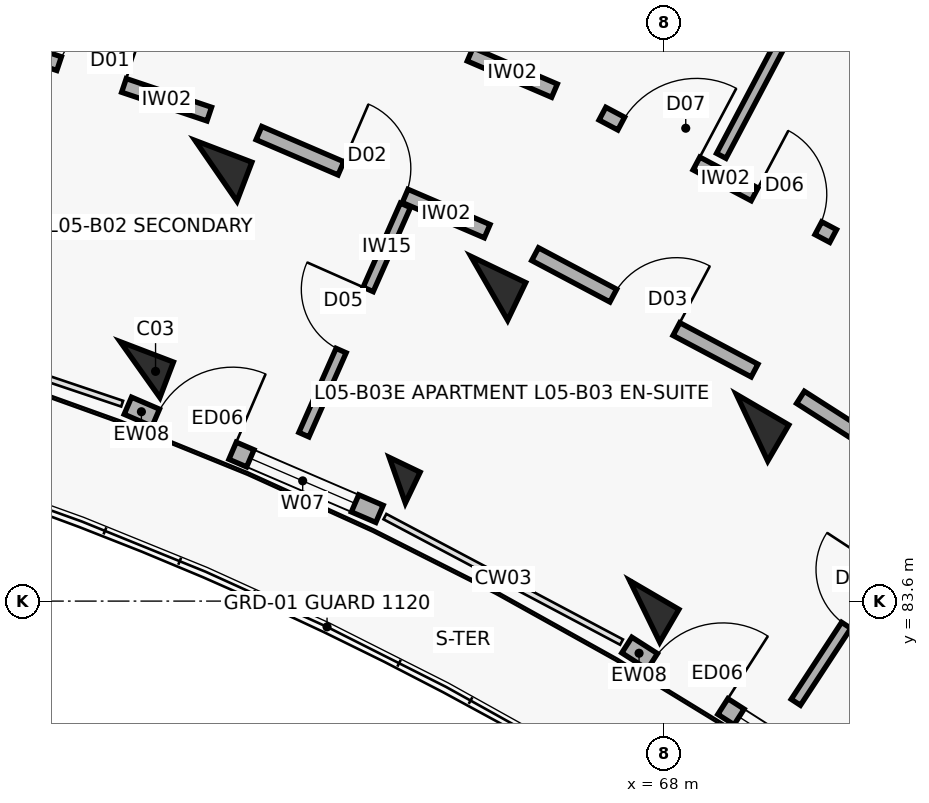
"""IFC4 building model, lengths in metres.
Left out: names, types, materials, properties, quantities, classifications, styles, units other than length and angle.
Written with IfcOpenShell. Run it as: python <this file> out.ifc"""

import sys

from ifc_helpers import new_model, si_unit, direction, frame, frame_2d, origin, origin_2d, place, context, subcontext, project, spatial, rectangle, extrude, element, fill, save


model = new_model("IFC4")
c1 = context("Model", 3, precision=1e-05, world=origin(), true_north=direction((0.0, 1.0)))
c2 = subcontext(c1, "Body", "Model", "MODEL_VIEW")
j1 = project(units=[si_unit("LENGTHUNIT", "METRE"), si_unit("PLANEANGLEUNIT", "RADIAN")], contexts=[c1])
p1 = place(None, origin())
s1 = spatial("IfcSite", under=j1, at=p1, CompositionType="ELEMENT")
p2 = place(p1, origin())
s2 = spatial("IfcBuilding", under=s1, at=p2, CompositionType="ELEMENT")
p3 = place(p2, frame((0.0, 0.0, 17.4)))
s3 = spatial("IfcBuildingStorey", under=s2, at=p3, CompositionType="ELEMENT", Elevation=17.4)
p4 = place(p3, frame((61.111, 86.646, 0.0), z_axis=(0.0, 0.0, 1.0), x_axis=(0.357064076459, 0.934079892355, 0.0)))
e1 = element("IfcColumn", 1, at=p4, inside=s3, PredefinedType="COLUMN", context=c2, shape_type="SweptSolid", body=[
    extrude(rectangle(XDim=0.5, YDim=0.75, at=origin_2d()), origin(), (0.0, 0.0, 1.0), 3.1),
])
p5 = place(p3, frame((62.111, 89.261, 0.0), z_axis=(0.0, 0.0, 1.0), x_axis=(0.357064076459, 0.934079892355, 0.0)))
e2 = element("IfcColumn", 2, at=p5, inside=s3, PredefinedType="COLUMN", context=c2, shape_type="SweptSolid", body=[
    extrude(rectangle(XDim=0.55, YDim=0.8, at=origin_2d()), origin(), (0.0, 0.0, 1.0), 3.1),
])
p6 = place(p3, frame((64.496, 85.191, 0.0), z_axis=(0.0, 0.0, 1.0), x_axis=(0.432085748802, 0.901832526405, 0.0)))
e3 = element("IfcColumn", 3, at=p6, inside=s3, PredefinedType="COLUMN", context=c2, shape_type="SweptSolid", body=[
    extrude(rectangle(XDim=0.45, YDim=0.45, at=origin_2d()), origin(), (0.0, 0.0, 1.0), 3.1),
])
p7 = place(p3, frame((65.706, 87.716, 0.0), z_axis=(0.0, 0.0, 1.0), x_axis=(0.432085748802, 0.901832526405, 0.0)))
e4 = element("IfcColumn", 4, at=p7, inside=s3, PredefinedType="COLUMN", context=c2, shape_type="SweptSolid", body=[
    extrude(rectangle(XDim=0.55, YDim=0.8, at=origin_2d()), origin(), (0.0, 0.0, 1.0), 3.1),
])
p8 = place(p3, frame((67.751, 83.464, 0.0), z_axis=(0.0, 0.0, 1.0), x_axis=(0.504226211181, 0.863571611366, 0.0)))
e5 = element("IfcColumn", 5, at=p8, inside=s3, PredefinedType="COLUMN", context=c2, shape_type="SweptSolid", body=[
    extrude(rectangle(XDim=0.5, YDim=0.75, at=origin_2d()), origin(), (0.0, 0.0, 1.0), 3.1),
])
p9 = place(p3, frame((69.163, 85.882, 0.0), z_axis=(0.0, 0.0, 1.0), x_axis=(0.504226211181, 0.863571611366, 0.0)))
e6 = element("IfcColumn", 6, at=p9, inside=s3, PredefinedType="COLUMN", context=c2, shape_type="SweptSolid", body=[
    extrude(rectangle(XDim=0.55, YDim=0.8, at=origin_2d()), origin(), (0.0, 0.0, 1.0), 3.1),
])
p10 = place(p3, frame((60.951, 86.171, 0.0), z_axis=(0.0, 0.0, 1.0), x_axis=(0.918713438577, -0.394924825477, 0.0)))
e7 = element("IfcWall", 7, at=p10, inside=s3, PredefinedType="SOLIDWALL", context=c2, shape_type="SweptSolid", body=[
    extrude(rectangle(XDim=3.604, YDim=0.245, at=frame_2d((1.802, 0.0))), origin(), (0.0, 0.0, 1.0), 2.25),
])
p11 = place(p10, frame((0.4, 0.0, 0.0)))
e8 = element("IfcOpeningElement", 8, at=p11, cuts=e7, PredefinedType="OPENING", context=c2, shape_type="SweptSolid", body=[
    extrude(rectangle(XDim=1.1, YDim=2.15, at=frame_2d((0.55, 1.075))), frame((0.0, 0.133, 0.0), z_axis=(0.0, -1.0, 0.0), x_axis=(1.0, 0.0, 0.0)), (0.0, 0.0, 1.0), 0.265),
])
p12 = place(p10, frame((1.754, 0.0, 0.35)))
e9 = element("IfcOpeningElement", 9, at=p12, cuts=e7, PredefinedType="OPENING", context=c2, shape_type="SweptSolid", body=[
    extrude(rectangle(XDim=1.5, YDim=1.65, at=frame_2d((0.75, 0.825))), frame((0.0, 0.133, 0.0), z_axis=(0.0, -1.0, 0.0), x_axis=(1.0, 0.0, 0.0)), (0.0, 0.0, 1.0), 0.265),
])
p13 = place(p3, frame((67.515, 83.022, 0.0), z_axis=(0.0, 0.0, 1.0), x_axis=(0.84225540507, -0.539078688718, 0.0)))
e10 = element("IfcWall", 10, at=p13, inside=s3, PredefinedType="SOLIDWALL", context=c2, shape_type="SweptSolid", body=[
    extrude(rectangle(XDim=3.604, YDim=0.245, at=frame_2d((1.802, 0.0))), origin(), (0.0, 0.0, 1.0), 2.25),
])
p14 = place(p13, frame((0.4, 0.0, 0.0)))
e11 = element("IfcOpeningElement", 11, at=p14, cuts=e10, PredefinedType="OPENING", context=c2, shape_type="SweptSolid", body=[
    extrude(rectangle(XDim=1.1, YDim=2.15, at=frame_2d((0.55, 1.075))), frame((0.0, 0.133, 0.0), z_axis=(0.0, -1.0, 0.0), x_axis=(1.0, 0.0, 0.0)), (0.0, 0.0, 1.0), 0.265),
])
p15 = place(p13, frame((1.754, 0.0, 0.35)))
e12 = element("IfcOpeningElement", 12, at=p15, cuts=e10, PredefinedType="OPENING", context=c2, shape_type="SweptSolid", body=[
    extrude(rectangle(XDim=1.5, YDim=1.65, at=frame_2d((0.75, 0.825))), frame((0.0, 0.133, 0.0), z_axis=(0.0, -1.0, 0.0), x_axis=(1.0, 0.0, 0.0)), (0.0, 0.0, 1.0), 0.265),
])
p16 = place(p3, frame((58.923, 91.049, 0.0), z_axis=(0.0, 0.0, 1.0), x_axis=(0.94787351033, -0.318646839643, 0.0)))
e13 = element("IfcWall", 13, at=p16, inside=s3, PredefinedType="SOLIDWALL", context=c2, shape_type="SweptSolid", body=[
    extrude(rectangle(XDim=3.269, YDim=0.19, at=frame_2d((1.634, 0.0))), origin(), (0.0, 0.0, 1.0), 2.08),
])
p17 = place(p16, frame((1.184, 0.0, 0.0)))
e14 = element("IfcOpeningElement", 14, at=p17, cuts=e13, PredefinedType="OPENING", context=c2, shape_type="SweptSolid", body=[
    extrude(rectangle(XDim=0.9, YDim=2.1, at=frame_2d((0.45, 1.05))), frame((0.0, 0.105, 0.0), z_axis=(0.0, -1.0, 0.0), x_axis=(1.0, 0.0, 0.0)), (0.0, 0.0, 1.0), 0.21),
])
p18 = place(p3, frame((63.407, 91.673, 0.0), z_axis=(0.0, 0.0, 1.0), x_axis=(0.918718172399, -0.394913813008, 0.0)))
e15 = element("IfcWall", 15, at=p18, inside=s3, PredefinedType="SOLIDWALL", context=c2, shape_type="SweptSolid", body=[
    extrude(rectangle(XDim=3.436, YDim=0.19, at=frame_2d((1.718, 0.0))), origin(), (0.0, 0.0, 1.0), 2.08),
])
p19 = place(p18, frame((1.208, 0.0, 0.0)))
e16 = element("IfcOpeningElement", 16, at=p19, cuts=e15, PredefinedType="OPENING", context=c2, shape_type="SweptSolid", body=[
    extrude(rectangle(XDim=1.02, YDim=2.15, at=frame_2d((0.51, 1.075))), frame((0.0, 0.105, 0.0), z_axis=(0.0, -1.0, 0.0), x_axis=(1.0, 0.0, 0.0)), (0.0, 0.0, 1.0), 0.21),
])
p20 = place(p3, frame((62.675, 89.758, 0.0), z_axis=(0.0, 0.0, 1.0), x_axis=(0.918723391052, -0.394901672235, 0.0)))
e17 = element("IfcWall", 17, at=p20, inside=s3, PredefinedType="SOLIDWALL", context=c2, shape_type="SweptSolid", body=[
    extrude(rectangle(XDim=3.269, YDim=0.19, at=frame_2d((1.634, 0.0))), origin(), (0.0, 0.0, 1.0), 2.08),
])
p21 = place(p20, frame((1.174, 0.0, 0.0)))
e18 = element("IfcOpeningElement", 18, at=p21, cuts=e17, PredefinedType="OPENING", context=c2, shape_type="SweptSolid", body=[
    extrude(rectangle(XDim=0.92, YDim=2.1, at=frame_2d((0.46, 1.05))), frame((0.0, 0.105, 0.0), z_axis=(0.0, -1.0, 0.0), x_axis=(1.0, 0.0, 0.0)), (0.0, 0.0, 1.0), 0.21),
])
p22 = place(p3, frame((63.267, 85.79, 0.0), z_axis=(0.0, 0.0, 1.0), x_axis=(0.404545283439, 0.91451796792, 0.0)))
e19 = element("IfcWall", 19, at=p22, inside=s3, PredefinedType="PARTITIONING", context=c2, shape_type="SweptSolid", body=[
    extrude(rectangle(XDim=3.3, YDim=0.145, at=frame_2d((1.65, 0.0))), origin(), (0.0, 0.0, 1.0), 2.08),
])
p23 = place(p22, frame((1.21, 0.0, 0.0)))
e20 = element("IfcOpeningElement", 20, at=p23, cuts=e19, PredefinedType="OPENING", context=c2, shape_type="SweptSolid", body=[
    extrude(rectangle(XDim=0.88, YDim=2.1, at=frame_2d((0.44, 1.05))), frame((0.0, 0.083, 0.0), z_axis=(0.0, -1.0, 0.0), x_axis=(1.0, 0.0, 0.0)), (0.0, 0.0, 1.0), 0.165),
])
p24 = place(p3, frame((67.194, 90.014, 0.0), z_axis=(0.0, 0.0, 1.0), x_axis=(0.883410853063, -0.468599258099, 0.0)))
e21 = element("IfcWall", 21, at=p24, inside=s3, PredefinedType="SOLIDWALL", context=c2, shape_type="SweptSolid", body=[
    extrude(rectangle(XDim=3.436, YDim=0.19, at=frame_2d((1.718, 0.0))), origin(), (0.0, 0.0, 1.0), 2.08),
])
p25 = place(p24, frame((0.28, 0.0, 0.0)))
e22 = element("IfcOpeningElement", 22, at=p25, cuts=e21, PredefinedType="OPENING", context=c2, shape_type="SweptSolid", body=[
    extrude(rectangle(XDim=1.12, YDim=2.15, at=frame_2d((0.56, 1.075))), frame((0.0, 0.105, 0.0), z_axis=(0.0, -1.0, 0.0), x_axis=(1.0, 0.0, 0.0)), (0.0, 0.0, 1.0), 0.21),
])
p26 = place(p24, frame((2.266, 0.0, 0.0)))
e23 = element("IfcOpeningElement", 23, at=p26, cuts=e21, PredefinedType="OPENING", context=c2, shape_type="SweptSolid", body=[
    extrude(rectangle(XDim=0.95, YDim=2.1, at=frame_2d((0.475, 1.05))), frame((0.0, 0.105, 0.0), z_axis=(0.0, -1.0, 0.0), x_axis=(1.0, 0.0, 0.0)), (0.0, 0.0, 1.0), 0.21),
])
p27 = place(p3, frame((66.309, 88.165, 0.0), z_axis=(0.0, 0.0, 1.0), x_axis=(0.883444301944, -0.468536194293, 0.0)))
e24 = element("IfcWall", 24, at=p27, inside=s3, PredefinedType="SOLIDWALL", context=c2, shape_type="SweptSolid", body=[
    extrude(rectangle(XDim=3.269, YDim=0.19, at=frame_2d((1.634, 0.0))), origin(), (0.0, 0.0, 1.0), 2.08),
])
p28 = place(p27, frame((1.164, 0.0, 0.0)))
e25 = element("IfcOpeningElement", 25, at=p28, cuts=e24, PredefinedType="OPENING", context=c2, shape_type="SweptSolid", body=[
    extrude(rectangle(XDim=0.94, YDim=2.1, at=frame_2d((0.47, 1.05))), frame((0.0, 0.105, 0.0), z_axis=(0.0, -1.0, 0.0), x_axis=(1.0, 0.0, 0.0)), (0.0, 0.0, 1.0), 0.21),
])
p29 = place(p3, frame((68.758, 89.459, 0.0), z_axis=(0.0, 0.0, 1.0), x_axis=(0.467208910392, 0.884146952746, 0.0)))
e26 = element("IfcWall", 26, at=p29, inside=s3, PredefinedType="PARTITIONING", context=c2, shape_type="SweptSolid", body=[
    extrude(rectangle(XDim=7.95, YDim=0.14, at=frame_2d((3.975, 0.0))), origin(), (0.0, 0.0, 1.0), 2.08),
])
p30 = place(p29, frame((6.05, 0.0, 0.0)))
e27 = element("IfcOpeningElement", 27, at=p30, cuts=e26, PredefinedType="OPENING", context=c2, shape_type="SweptSolid", body=[
    extrude(rectangle(XDim=0.92, YDim=2.1, at=frame_2d((0.46, 1.05))), frame((0.0, 0.08, 0.0), z_axis=(0.0, -1.0, 0.0), x_axis=(1.0, 0.0, 0.0)), (0.0, 0.0, 1.0), 0.16),
])
p31 = place(p3, frame((69.8, 86.281, 0.0), z_axis=(0.0, 0.0, 1.0), x_axis=(0.842225276846, -0.539125758095, 0.0)))
e28 = element("IfcWall", 28, at=p31, inside=s3, PredefinedType="SOLIDWALL", context=c2, shape_type="SweptSolid", body=[
    extrude(rectangle(XDim=3.269, YDim=0.19, at=frame_2d((1.634, 0.0))), origin(), (0.0, 0.0, 1.0), 2.08),
])
p32 = place(p31, frame((1.154, 0.0, 0.0)))
e29 = element("IfcOpeningElement", 29, at=p32, cuts=e28, PredefinedType="OPENING", context=c2, shape_type="SweptSolid", body=[
    extrude(rectangle(XDim=0.96, YDim=2.1, at=frame_2d((0.48, 1.05))), frame((0.0, 0.105, 0.0), z_axis=(0.0, -1.0, 0.0), x_axis=(1.0, 0.0, 0.0)), (0.0, 0.0, 1.0), 0.21),
])
p33 = place(p3, frame((69.739, 82.269, 0.0), z_axis=(0.0, 0.0, 1.0), x_axis=(0.547920940513, 0.836530120765, 0.0)))
e30 = element("IfcWall", 30, at=p33, inside=s3, PredefinedType="PARTITIONING", context=c2, shape_type="SweptSolid", body=[
    extrude(rectangle(XDim=3.3, YDim=0.145, at=frame_2d((1.65, 0.0))), origin(), (0.0, 0.0, 1.0), 2.08),
])
p34 = place(p33, frame((1.21, 0.0, 0.0)))
e31 = element("IfcOpeningElement", 31, at=p34, cuts=e30, PredefinedType="OPENING", context=c2, shape_type="SweptSolid", body=[
    extrude(rectangle(XDim=0.88, YDim=2.1, at=frame_2d((0.44, 1.05))), frame((0.0, 0.083, 0.0), z_axis=(0.0, -1.0, 0.0), x_axis=(1.0, 0.0, 0.0)), (0.0, 0.0, 1.0), 0.165),
])
p35 = place(p11, origin())
e32 = element("IfcDoor", 32, at=p35, inside=s3, OperationType="SINGLE_SWING_RIGHT", PredefinedType="DOOR", context=c2, shape_type="SweptSolid", body=[
    extrude(rectangle(XDim=1.1, YDim=2.15, at=frame_2d((0.55, 1.075))), frame((0.0, 0.025, 0.0), z_axis=(0.0, -1.0, 0.0), x_axis=(1.0, 0.0, 0.0)), (0.0, 0.0, 1.0), 0.05),
])
fill(e8, e32)
p36 = place(p12, origin())
e33 = element("IfcWindow", 33, at=p36, inside=s3, PartitioningType="DOUBLE_PANEL_VERTICAL", PredefinedType="WINDOW", context=c2, shape_type="SweptSolid", body=[
    extrude(rectangle(XDim=1.5, YDim=1.65, at=frame_2d((0.75, 0.825))), frame((0.0, 0.03, 0.0), z_axis=(0.0, -1.0, 0.0), x_axis=(1.0, 0.0, 0.0)), (0.0, 0.0, 1.0), 0.06),
])
fill(e9, e33)
p37 = place(p14, origin())
e34 = element("IfcDoor", 34, at=p37, inside=s3, OperationType="SINGLE_SWING_RIGHT", PredefinedType="DOOR", context=c2, shape_type="SweptSolid", body=[
    extrude(rectangle(XDim=1.1, YDim=2.15, at=frame_2d((0.55, 1.075))), frame((0.0, 0.025, 0.0), z_axis=(0.0, -1.0, 0.0), x_axis=(1.0, 0.0, 0.0)), (0.0, 0.0, 1.0), 0.05),
])
fill(e11, e34)
p38 = place(p15, origin())
e35 = element("IfcWindow", 35, at=p38, inside=s3, PartitioningType="DOUBLE_PANEL_VERTICAL", PredefinedType="WINDOW", context=c2, shape_type="SweptSolid", body=[
    extrude(rectangle(XDim=1.5, YDim=1.65, at=frame_2d((0.75, 0.825))), frame((0.0, 0.03, 0.0), z_axis=(0.0, -1.0, 0.0), x_axis=(1.0, 0.0, 0.0)), (0.0, 0.0, 1.0), 0.06),
])
fill(e12, e35)
p39 = place(p17, origin())
e36 = element("IfcDoor", 36, at=p39, inside=s3, OperationType="SINGLE_SWING_RIGHT", PredefinedType="DOOR", context=c2, shape_type="SweptSolid", body=[
    extrude(rectangle(XDim=0.9, YDim=2.1, at=frame_2d((0.45, 1.05))), frame((0.0, 0.025, 0.0), z_axis=(0.0, -1.0, 0.0), x_axis=(1.0, 0.0, 0.0)), (0.0, 0.0, 1.0), 0.05),
])
fill(e14, e36)
p40 = place(p19, origin())
e37 = element("IfcDoor", 37, at=p40, inside=s3, OperationType="SINGLE_SWING_RIGHT", PredefinedType="DOOR", context=c2, shape_type="SweptSolid", body=[
    extrude(rectangle(XDim=1.02, YDim=2.15, at=frame_2d((0.51, 1.075))), frame((0.0, 0.025, 0.0), z_axis=(0.0, -1.0, 0.0), x_axis=(1.0, 0.0, 0.0)), (0.0, 0.0, 1.0), 0.05),
])
fill(e16, e37)
p41 = place(p21, origin())
e38 = element("IfcDoor", 38, at=p41, inside=s3, OperationType="SINGLE_SWING_LEFT", PredefinedType="DOOR", context=c2, shape_type="SweptSolid", body=[
    extrude(rectangle(XDim=0.92, YDim=2.1, at=frame_2d((0.46, 1.05))), frame((0.0, 0.025, 0.0), z_axis=(0.0, -1.0, 0.0), x_axis=(1.0, 0.0, 0.0)), (0.0, 0.0, 1.0), 0.05),
])
fill(e18, e38)
p42 = place(p23, origin())
e39 = element("IfcDoor", 39, at=p42, inside=s3, OperationType="SINGLE_SWING_RIGHT", PredefinedType="DOOR", context=c2, shape_type="SweptSolid", body=[
    extrude(rectangle(XDim=0.88, YDim=2.1, at=frame_2d((0.44, 1.05))), frame((0.0, 0.025, 0.0), z_axis=(0.0, -1.0, 0.0), x_axis=(1.0, 0.0, 0.0)), (0.0, 0.0, 1.0), 0.05),
])
fill(e20, e39)
p43 = place(p25, origin())
e40 = element("IfcDoor", 40, at=p43, inside=s3, OperationType="SINGLE_SWING_RIGHT", PredefinedType="DOOR", context=c2, shape_type="SweptSolid", body=[
    extrude(rectangle(XDim=1.12, YDim=2.15, at=frame_2d((0.56, 1.075))), frame((0.0, 0.025, 0.0), z_axis=(0.0, -1.0, 0.0), x_axis=(1.0, 0.0, 0.0)), (0.0, 0.0, 1.0), 0.05),
])
fill(e22, e40)
p44 = place(p26, origin())
e41 = element("IfcDoor", 41, at=p44, inside=s3, OperationType="SINGLE_SWING_LEFT", PredefinedType="DOOR", context=c2, shape_type="SweptSolid", body=[
    extrude(rectangle(XDim=0.95, YDim=2.1, at=frame_2d((0.475, 1.05))), frame((0.0, 0.025, 0.0), z_axis=(0.0, -1.0, 0.0), x_axis=(1.0, 0.0, 0.0)), (0.0, 0.0, 1.0), 0.05),
])
fill(e23, e41)
p45 = place(p28, origin())
e42 = element("IfcDoor", 42, at=p45, inside=s3, OperationType="SINGLE_SWING_RIGHT", PredefinedType="DOOR", context=c2, shape_type="SweptSolid", body=[
    extrude(rectangle(XDim=0.94, YDim=2.1, at=frame_2d((0.47, 1.05))), frame((0.0, 0.025, 0.0), z_axis=(0.0, -1.0, 0.0), x_axis=(1.0, 0.0, 0.0)), (0.0, 0.0, 1.0), 0.05),
])
fill(e25, e42)
p46 = place(p34, origin())
e43 = element("IfcDoor", 43, at=p46, inside=s3, OperationType="SINGLE_SWING_RIGHT", PredefinedType="DOOR", context=c2, shape_type="SweptSolid", body=[
    extrude(rectangle(XDim=0.88, YDim=2.1, at=frame_2d((0.44, 1.05))), frame((0.0, 0.025, 0.0), z_axis=(0.0, -1.0, 0.0), x_axis=(1.0, 0.0, 0.0)), (0.0, 0.0, 1.0), 0.05),
])
fill(e31, e43)
save(model, sys.argv[1])
